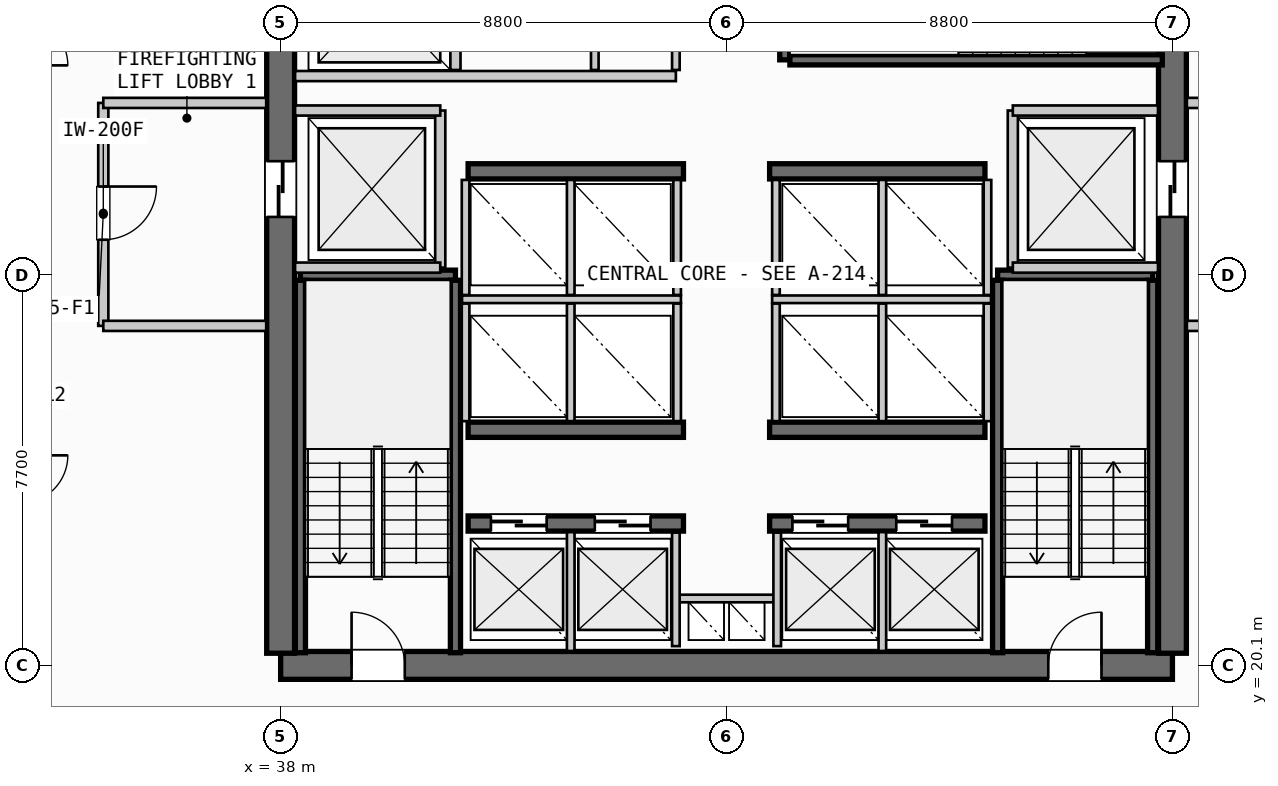
"""IFC4 building model, lengths in metres.
Left out: names, types, materials, properties, quantities, classifications, styles, units other than length and angle.
Written with IfcOpenShell. Run it as: python <this file> out.ifc"""

import sys

from ifc_helpers import new_model, si_unit, direction, frame, frame_2d, origin, place, context, subcontext, project, spatial, rectangle, extrude, source, transform, mapped, element, fill, save


model = new_model("IFC4")
c1 = context("Model", 3, precision=1e-05, world=origin(), true_north=direction((0.0, 1.0)))
c2 = subcontext(c1, "Body", "Model", "MODEL_VIEW")
j1 = project(units=[si_unit("LENGTHUNIT", "METRE"), si_unit("PLANEANGLEUNIT", "RADIAN")], contexts=[c1])
p1 = place(None, origin())
s1 = spatial("IfcSite", under=j1, at=p1, CompositionType="ELEMENT")
p2 = place(p1, origin())
s2 = spatial("IfcBuilding", under=s1, at=p2, CompositionType="ELEMENT")
p3 = place(p2, frame((0.0, 0.0, 103.6)))
s3 = spatial("IfcBuildingStorey", under=s2, at=p3, CompositionType="ELEMENT", Elevation=103.6)
p4 = place(p3, frame((38.0, 20.1, 0.0), z_axis=(0.0, 0.0, 1.0), x_axis=(1.0, 0.0, 0.0)))
e1 = element("IfcWall", 1, at=p4, inside=s3, PredefinedType="SHEAR", context=c2, shape_type="SweptSolid", body=[
    extrude(rectangle(XDim=17.6, YDim=0.55, at=frame_2d((8.8, 0.0))), origin(), (0.0, 0.0, 1.0), 3.35),
])
p5 = place(p4, frame((1.4, 0.0, 0.0)))
e2 = element("IfcOpeningElement", 2, at=p5, cuts=e1, PredefinedType="OPENING", context=c2, shape_type="SweptSolid", body=[
    extrude(rectangle(XDim=1.05, YDim=2.15, at=frame_2d((0.525, 1.075))), frame((0.0, 0.285, 0.0), z_axis=(0.0, -1.0, 0.0), x_axis=(1.0, 0.0, 0.0)), (0.0, 0.0, 1.0), 0.57),
])
p6 = place(p4, frame((15.15, 0.0, 0.0)))
e3 = element("IfcOpeningElement", 3, at=p6, cuts=e1, PredefinedType="OPENING", context=c2, shape_type="SweptSolid", body=[
    extrude(rectangle(XDim=1.05, YDim=2.15, at=frame_2d((0.525, 1.075))), frame((0.0, 0.285, 0.0), z_axis=(0.0, -1.0, 0.0), x_axis=(1.0, 0.0, 0.0)), (0.0, 0.0, 1.0), 0.57),
])
p7 = place(p3, frame((38.0, 35.26, 0.0), z_axis=(0.0, 0.0, 1.0), x_axis=(0.0, -1.0, 0.0)))
e4 = element("IfcWall", 4, at=p7, inside=s3, PredefinedType="SHEAR", context=c2, shape_type="SweptSolid", body=[
    extrude(rectangle(XDim=14.92, YDim=0.55, at=frame_2d((7.46, 0.0))), origin(), (0.0, 0.0, 1.0), 3.35),
])
p8 = place(p7, frame((5.21, 0.0, 0.0)))
e5 = element("IfcOpeningElement", 5, at=p8, cuts=e4, PredefinedType="OPENING", context=c2, shape_type="SweptSolid", body=[
    extrude(rectangle(XDim=1.1, YDim=2.2, at=frame_2d((0.55, 1.1))), frame((0.0, 0.285, 0.0), z_axis=(0.0, -1.0, 0.0), x_axis=(1.0, 0.0, 0.0)), (0.0, 0.0, 1.0), 0.57),
])
p9 = place(p3, frame((55.6, 20.34, 0.0), z_axis=(0.0, 0.0, 1.0), x_axis=(0.0, 1.0, 0.0)))
e6 = element("IfcWall", 6, at=p9, inside=s3, PredefinedType="SHEAR", context=c2, shape_type="SweptSolid", body=[
    extrude(rectangle(XDim=14.92, YDim=0.55, at=frame_2d((7.46, 0.0))), origin(), (0.0, 0.0, 1.0), 3.35),
])
p10 = place(p9, frame((12.71, 0.0, 0.0)))
e7 = element("IfcOpeningElement", 7, at=p10, cuts=e6, PredefinedType="OPENING", context=c2, shape_type="SweptSolid", body=[
    extrude(rectangle(XDim=1.05, YDim=2.15, at=frame_2d((0.525, 1.075))), frame((0.0, 0.285, 0.0), z_axis=(0.0, -1.0, 0.0), x_axis=(1.0, 0.0, 0.0)), (0.0, 0.0, 1.0), 0.57),
])
p11 = place(p9, frame((8.61, 0.0, 0.0)))
e8 = element("IfcOpeningElement", 8, at=p11, cuts=e6, PredefinedType="OPENING", context=c2, shape_type="SweptSolid", body=[
    extrude(rectangle(XDim=1.1, YDim=2.2, at=frame_2d((0.55, 1.1))), frame((0.0, 0.285, 0.0), z_axis=(0.0, -1.0, 0.0), x_axis=(1.0, 0.0, 0.0)), (0.0, 0.0, 1.0), 0.57),
])
p12 = place(p3, frame((41.7, 22.9, 0.0), z_axis=(0.0, 0.0, 1.0), x_axis=(1.0, 0.0, 0.0)))
e9 = element("IfcWall", 9, at=p12, inside=s3, PredefinedType="SHEAR", context=c2, shape_type="SweptSolid", body=[
    extrude(rectangle(XDim=4.25, YDim=0.3, at=frame_2d((2.125, 0.0))), origin(), (0.0, 0.0, 1.0), 3.35),
])
p13 = place(p12, frame((0.45, 0.0, 0.0)))
e10 = element("IfcOpeningElement", 10, at=p13, cuts=e9, PredefinedType="OPENING", context=c2, shape_type="SweptSolid", body=[
    extrude(rectangle(XDim=1.1, YDim=2.2, at=frame_2d((0.55, 1.1))), frame((0.0, 0.16, 0.0), z_axis=(0.0, -1.0, 0.0), x_axis=(1.0, 0.0, 0.0)), (0.0, 0.0, 1.0), 0.32),
])
p14 = place(p12, frame((2.5, 0.0, 0.0)))
e11 = element("IfcOpeningElement", 11, at=p14, cuts=e9, PredefinedType="OPENING", context=c2, shape_type="SweptSolid", body=[
    extrude(rectangle(XDim=1.1, YDim=2.2, at=frame_2d((0.55, 1.1))), frame((0.0, 0.16, 0.0), z_axis=(0.0, -1.0, 0.0), x_axis=(1.0, 0.0, 0.0)), (0.0, 0.0, 1.0), 0.32),
])
p15 = place(p3, frame((47.65, 22.9, 0.0), z_axis=(0.0, 0.0, 1.0), x_axis=(1.0, 0.0, 0.0)))
e12 = element("IfcWall", 12, at=p15, inside=s3, PredefinedType="SHEAR", context=c2, shape_type="SweptSolid", body=[
    extrude(rectangle(XDim=4.25, YDim=0.3, at=frame_2d((2.125, 0.0))), origin(), (0.0, 0.0, 1.0), 3.35),
])
p16 = place(p15, frame((0.45, 0.0, 0.0)))
e13 = element("IfcOpeningElement", 13, at=p16, cuts=e12, PredefinedType="OPENING", context=c2, shape_type="SweptSolid", body=[
    extrude(rectangle(XDim=1.1, YDim=2.2, at=frame_2d((0.55, 1.1))), frame((0.0, 0.16, 0.0), z_axis=(0.0, -1.0, 0.0), x_axis=(1.0, 0.0, 0.0)), (0.0, 0.0, 1.0), 0.32),
])
p17 = place(p15, frame((2.5, 0.0, 0.0)))
e14 = element("IfcOpeningElement", 14, at=p17, cuts=e12, PredefinedType="OPENING", context=c2, shape_type="SweptSolid", body=[
    extrude(rectangle(XDim=1.1, YDim=2.2, at=frame_2d((0.55, 1.1))), frame((0.0, 0.16, 0.0), z_axis=(0.0, -1.0, 0.0), x_axis=(1.0, 0.0, 0.0)), (0.0, 0.0, 1.0), 0.32),
])
for number, where, z_axis, x_axis in (
    (15, (41.7, 24.75, 0.0), (0.0, 0.0, 1.0), (1.0, 0.0, 0.0)),
    (16, (47.65, 24.75, 0.0), (0.0, 0.0, 1.0), (1.0, 0.0, 0.0)),
    (17, (41.7, 29.85, 0.0), (0.0, 0.0, 1.0), (1.0, 0.0, 0.0)),
    (18, (47.65, 29.85, 0.0), (0.0, 0.0, 1.0), (1.0, 0.0, 0.0)),
):
    element("IfcWall", number, at=place(p3, frame(where, z_axis=z_axis, x_axis=x_axis)), inside=s3, PredefinedType="SHEAR", context=c2, shape_type="SweptSolid", body=[
        extrude(rectangle(XDim=4.25, YDim=0.3, at=frame_2d((2.125, 0.0))), origin(), (0.0, 0.0, 1.0), 3.35),
    ])
p18 = place(p3, frame((38.39, 27.8, 0.0), z_axis=(0.0, 0.0, 1.0), x_axis=(1.0, 0.0, 0.0)))
e19 = element("IfcWall", 19, at=p18, inside=s3, PredefinedType="SHEAR", context=c2, shape_type="SweptSolid", body=[
    extrude(rectangle(XDim=3.06, YDim=0.2, at=frame_2d((1.53, 0.0))), origin(), (0.0, 0.0, 1.0), 3.35),
])
for number, where, z_axis, x_axis in (
    (20, (41.45, 27.7, 0.0), (0.0, 0.0, 1.0), (0.0, -1.0, 0.0)),
    (21, (38.39, 20.35, 0.0), (0.0, 0.0, 1.0), (0.0, 1.0, 0.0)),
):
    element("IfcWall", number, at=place(p3, frame(where, z_axis=z_axis, x_axis=x_axis)), inside=s3, PredefinedType="SHEAR", context=c2, shape_type="SweptSolid", body=[
        extrude(rectangle(XDim=7.35, YDim=0.2, at=frame_2d((3.675, 0.0))), origin(), (0.0, 0.0, 1.0), 3.35),
    ])
p19 = place(p3, frame((52.15, 27.8, 0.0), z_axis=(0.0, 0.0, 1.0), x_axis=(1.0, 0.0, 0.0)))
e22 = element("IfcWall", 22, at=p19, inside=s3, PredefinedType="SHEAR", context=c2, shape_type="SweptSolid", body=[
    extrude(rectangle(XDim=3.06, YDim=0.2, at=frame_2d((1.53, 0.0))), origin(), (0.0, 0.0, 1.0), 3.35),
])
for number, where, z_axis, x_axis in (
    (23, (55.21, 27.7, 0.0), (0.0, 0.0, 1.0), (0.0, -1.0, 0.0)),
    (24, (52.15, 20.35, 0.0), (0.0, 0.0, 1.0), (0.0, 1.0, 0.0)),
):
    element("IfcWall", number, at=place(p3, frame(where, z_axis=z_axis, x_axis=x_axis)), inside=s3, PredefinedType="SHEAR", context=c2, shape_type="SweptSolid", body=[
        extrude(rectangle(XDim=7.35, YDim=0.2, at=frame_2d((3.675, 0.0))), origin(), (0.0, 0.0, 1.0), 3.35),
    ])
p20 = place(p3, frame((47.95, 32.05, 0.0), z_axis=(0.0, 0.0, 1.0), x_axis=(0.0, 1.0, 0.0)))
e25 = element("IfcWall", 25, at=p20, inside=s3, PredefinedType="SHEAR", context=c2, shape_type="SweptSolid", body=[
    extrude(rectangle(XDim=3.06, YDim=0.2, at=frame_2d((1.53, 0.0))), origin(), (0.0, 0.0, 1.0), 3.35),
])
p21 = place(p3, frame((55.4, 32.05, 0.0), z_axis=(0.0, 0.0, 1.0), x_axis=(-1.0, 0.0, 0.0)))
e26 = element("IfcWall", 26, at=p21, inside=s3, PredefinedType="SHEAR", context=c2, shape_type="SweptSolid", body=[
    extrude(rectangle(XDim=7.35, YDim=0.2, at=frame_2d((3.675, 0.0))), origin(), (0.0, 0.0, 1.0), 3.35),
])
p22 = place(p3, frame((45.8, 21.42, 0.0), z_axis=(0.0, 0.0, 1.0), x_axis=(1.0, 0.0, 0.0)))
e27 = element("IfcWall", 27, at=p22, inside=s3, PredefinedType="PARTITIONING", context=c2, shape_type="SweptSolid", body=[
    extrude(rectangle(XDim=2.0, YDim=0.15, at=frame_2d((1.0, 0.0))), origin(), (0.0, 0.0, 1.0), 2.28),
])
for number, where, z_axis, x_axis in (
    (28, (45.8, 20.48, 0.0), (0.0, 0.0, 1.0), (0.0, 1.0, 0.0)),
    (29, (47.8, 20.48, 0.0), (0.0, 0.0, 1.0), (0.0, 1.0, 0.0)),
):
    element("IfcWall", number, at=place(p3, frame(where, z_axis=z_axis, x_axis=x_axis)), inside=s3, PredefinedType="PARTITIONING", context=c2, shape_type="SweptSolid", body=[
        extrude(rectangle(XDim=2.24, YDim=0.15, at=frame_2d((1.12, 0.0))), origin(), (0.0, 0.0, 1.0), 2.28),
    ])
p23 = place(p3, frame((41.15, 27.95, 0.0), z_axis=(0.0, 0.0, 1.0), x_axis=(0.0, 1.0, 0.0)))
e30 = element("IfcWall", 30, at=p23, inside=s3, PredefinedType="PARTITIONING", context=c2, shape_type="SweptSolid", body=[
    extrude(rectangle(XDim=3.1, YDim=0.2, at=frame_2d((1.55, 0.0))), origin(), (0.0, 0.0, 1.0), 2.28),
])
for number, where, z_axis, x_axis in (
    (31, (38.285, 27.95, 0.0), (0.0, 0.0, 1.0), (1.0, 0.0, 0.0)),
    (32, (38.285, 31.05, 0.0), (0.0, 0.0, 1.0), (1.0, 0.0, 0.0)),
):
    element("IfcWall", number, at=place(p3, frame(where, z_axis=z_axis, x_axis=x_axis)), inside=s3, PredefinedType="PARTITIONING", context=c2, shape_type="SweptSolid", body=[
        extrude(rectangle(XDim=2.865, YDim=0.2, at=frame_2d((1.433, 0.0))), origin(), (0.0, 0.0, 1.0), 2.28),
    ])
p24 = place(p3, frame((34.5, 31.2, 0.0), z_axis=(0.0, 0.0, 1.0), x_axis=(0.0, -1.0, 0.0)))
e33 = element("IfcWall", 33, at=p24, inside=s3, PredefinedType="PARTITIONING", context=c2, shape_type="SweptSolid", body=[
    extrude(rectangle(XDim=4.4, YDim=0.2, at=frame_2d((2.2, 0.0))), origin(), (0.0, 0.0, 1.0), 2.28),
])
p25 = place(p24, frame((1.65, 0.0, 0.0)))
e34 = element("IfcOpeningElement", 34, at=p25, cuts=e33, PredefinedType="OPENING", context=c2, shape_type="SweptSolid", body=[
    extrude(rectangle(XDim=1.05, YDim=2.15, at=frame_2d((0.525, 1.075))), frame((0.0, 0.11, 0.0), z_axis=(0.0, -1.0, 0.0), x_axis=(1.0, 0.0, 0.0)), (0.0, 0.0, 1.0), 0.22),
])
for number, where, z_axis, x_axis in (
    (35, (34.5, 26.8, 0.0), (0.0, 0.0, 1.0), (1.0, 0.0, 0.0)),
    (36, (34.5, 31.2, 0.0), (0.0, 0.0, 1.0), (1.0, 0.0, 0.0)),
):
    element("IfcWall", number, at=place(p3, frame(where, z_axis=z_axis, x_axis=x_axis)), inside=s3, PredefinedType="PARTITIONING", context=c2, shape_type="SweptSolid", body=[
        extrude(rectangle(XDim=3.215, YDim=0.2, at=frame_2d((1.607, 0.0))), origin(), (0.0, 0.0, 1.0), 2.28),
    ])
p26 = place(p3, frame((52.45, 27.95, 0.0), z_axis=(0.0, 0.0, 1.0), x_axis=(0.0, 1.0, 0.0)))
e37 = element("IfcWall", 37, at=p26, inside=s3, PredefinedType="PARTITIONING", context=c2, shape_type="SweptSolid", body=[
    extrude(rectangle(XDim=3.1, YDim=0.2, at=frame_2d((1.55, 0.0))), origin(), (0.0, 0.0, 1.0), 2.28),
])
for number, where, z_axis, x_axis in (
    (38, (52.45, 27.95, 0.0), (0.0, 0.0, 1.0), (1.0, 0.0, 0.0)),
    (39, (52.45, 31.05, 0.0), (0.0, 0.0, 1.0), (1.0, 0.0, 0.0)),
):
    element("IfcWall", number, at=place(p3, frame(where, z_axis=z_axis, x_axis=x_axis)), inside=s3, PredefinedType="PARTITIONING", context=c2, shape_type="SweptSolid", body=[
        extrude(rectangle(XDim=2.865, YDim=0.2, at=frame_2d((1.433, 0.0))), origin(), (0.0, 0.0, 1.0), 2.28),
    ])
for number, where, z_axis, x_axis in (
    (40, (55.885, 26.8, 0.0), (0.0, 0.0, 1.0), (1.0, 0.0, 0.0)),
    (41, (55.885, 31.2, 0.0), (0.0, 0.0, 1.0), (1.0, 0.0, 0.0)),
):
    element("IfcWall", number, at=place(p3, frame(where, z_axis=z_axis, x_axis=x_axis)), inside=s3, PredefinedType="PARTITIONING", context=c2, shape_type="SweptSolid", body=[
        extrude(rectangle(XDim=3.215, YDim=0.2, at=frame_2d((1.607, 0.0))), origin(), (0.0, 0.0, 1.0), 2.28),
    ])
for number, where, z_axis, x_axis in (
    (42, (43.725, 20.385, 0.0), (0.0, 0.0, 1.0), (0.0, 1.0, 0.0)),
    (43, (49.875, 20.385, 0.0), (0.0, 0.0, 1.0), (0.0, 1.0, 0.0)),
):
    element("IfcWall", number, at=place(p3, frame(where, z_axis=z_axis, x_axis=x_axis)), inside=s3, PredefinedType="PARTITIONING", context=c2, shape_type="SweptSolid", body=[
        extrude(rectangle(XDim=2.345, YDim=0.15, at=frame_2d((1.172, 0.0))), origin(), (0.0, 0.0, 1.0), 2.28),
    ])
p27 = place(p3, frame((41.58, 27.325, 0.0), z_axis=(0.0, 0.0, 1.0), x_axis=(1.0, 0.0, 0.0)))
e44 = element("IfcWall", 44, at=p27, inside=s3, PredefinedType="PARTITIONING", context=c2, shape_type="SweptSolid", body=[
    extrude(rectangle(XDim=4.32, YDim=0.15, at=frame_2d((2.16, 0.0))), origin(), (0.0, 0.0, 1.0), 2.28),
])
p28 = place(p3, frame((47.7, 27.325, 0.0), z_axis=(0.0, 0.0, 1.0), x_axis=(1.0, 0.0, 0.0)))
e45 = element("IfcWall", 45, at=p28, inside=s3, PredefinedType="PARTITIONING", context=c2, shape_type="SweptSolid", body=[
    extrude(rectangle(XDim=4.32, YDim=0.15, at=frame_2d((2.16, 0.0))), origin(), (0.0, 0.0, 1.0), 2.28),
])
for number, where, z_axis, x_axis in (
    (46, (41.65, 24.92, 0.0), (0.0, 0.0, 1.0), (0.0, 1.0, 0.0)),
    (47, (43.725, 24.92, 0.0), (0.0, 0.0, 1.0), (0.0, 1.0, 0.0)),
    (48, (45.825, 24.92, 0.0), (0.0, 0.0, 1.0), (0.0, 1.0, 0.0)),
    (49, (47.775, 24.92, 0.0), (0.0, 0.0, 1.0), (0.0, 1.0, 0.0)),
    (50, (49.875, 24.92, 0.0), (0.0, 0.0, 1.0), (0.0, 1.0, 0.0)),
    (51, (51.95, 24.92, 0.0), (0.0, 0.0, 1.0), (0.0, 1.0, 0.0)),
):
    element("IfcWall", number, at=place(p3, frame(where, z_axis=z_axis, x_axis=x_axis)), inside=s3, PredefinedType="PARTITIONING", context=c2, shape_type="SweptSolid", body=[
        extrude(rectangle(XDim=2.32, YDim=0.15, at=frame_2d((1.16, 0.0))), origin(), (0.0, 0.0, 1.0), 2.28),
    ])
for number, where, z_axis, x_axis in (
    (52, (41.65, 27.41, 0.0), (0.0, 0.0, 1.0), (0.0, 1.0, 0.0)),
    (53, (43.725, 27.41, 0.0), (0.0, 0.0, 1.0), (0.0, 1.0, 0.0)),
    (54, (45.825, 27.41, 0.0), (0.0, 0.0, 1.0), (0.0, 1.0, 0.0)),
    (55, (47.775, 27.41, 0.0), (0.0, 0.0, 1.0), (0.0, 1.0, 0.0)),
    (56, (49.875, 27.41, 0.0), (0.0, 0.0, 1.0), (0.0, 1.0, 0.0)),
    (57, (51.95, 27.41, 0.0), (0.0, 0.0, 1.0), (0.0, 1.0, 0.0)),
):
    element("IfcWall", number, at=place(p3, frame(where, z_axis=z_axis, x_axis=x_axis)), inside=s3, PredefinedType="PARTITIONING", context=c2, shape_type="SweptSolid", body=[
        extrude(rectangle(XDim=2.27, YDim=0.15, at=frame_2d((1.135, 0.0))), origin(), (0.0, 0.0, 1.0), 2.28),
    ])
p29 = place(p3, frame((41.45, 31.85, 0.0), z_axis=(0.0, 0.0, 1.0), x_axis=(0.0, 1.0, 0.0)))
e58 = element("IfcWall", 58, at=p29, inside=s3, PredefinedType="PARTITIONING", context=c2, shape_type="SweptSolid", body=[
    extrude(rectangle(XDim=3.365, YDim=0.2, at=frame_2d((1.683, 0.0))), origin(), (0.0, 0.0, 1.0), 2.28),
])
p30 = place(p3, frame((38.285, 31.73, 0.0), z_axis=(0.0, 0.0, 1.0), x_axis=(1.0, 0.0, 0.0)))
e59 = element("IfcWall", 59, at=p30, inside=s3, PredefinedType="PARTITIONING", context=c2, shape_type="SweptSolid", body=[
    extrude(rectangle(XDim=7.515, YDim=0.2, at=frame_2d((3.758, 0.0))), origin(), (0.0, 0.0, 1.0), 2.28),
])
p31 = place(p3, frame((45.8, 31.85, 0.0), z_axis=(0.0, 0.0, 1.0), x_axis=(0.0, 1.0, 0.0)))
e60 = element("IfcWall", 60, at=p31, inside=s3, PredefinedType="PARTITIONING", context=c2, shape_type="SweptSolid", body=[
    extrude(rectangle(XDim=3.365, YDim=0.15, at=frame_2d((1.683, 0.0))), origin(), (0.0, 0.0, 1.0), 2.28),
])
p32 = place(p3, frame((44.2, 31.85, 0.0), z_axis=(0.0, 0.0, 1.0), x_axis=(0.0, 1.0, 0.0)))
e61 = element("IfcWall", 61, at=p32, inside=s3, PredefinedType="PLUMBINGWALL", context=c2, shape_type="SweptSolid", body=[
    extrude(rectangle(XDim=3.365, YDim=0.15, at=frame_2d((1.683, 0.0))), origin(), (0.0, 0.0, 1.0), 2.28),
])
m1 = source(origin(), c2, "Body", "SweptSolid", [
    extrude(rectangle(XDim=1.05, YDim=2.15, at=frame_2d((0.525, 1.075))), frame((0.0, 0.025, 0.0), z_axis=(0.0, -1.0, 0.0), x_axis=(1.0, 0.0, 0.0)), (0.0, 0.0, 1.0), 0.05),
])
p33 = place(p5, origin())
e62 = element("IfcDoor", 62, at=p33, inside=s3, OperationType="SINGLE_SWING_LEFT", PredefinedType="DOOR", context=c2, shape_type="MappedRepresentation", body=[
    mapped(m1, transform((0.0, 0.0, 0.0), scale=1.0)),
])
fill(e2, e62)
p34 = place(p6, origin())
e63 = element("IfcDoor", 63, at=p34, inside=s3, OperationType="SINGLE_SWING_RIGHT", PredefinedType="DOOR", context=c2, shape_type="MappedRepresentation", body=[
    mapped(m1, transform((0.0, 0.0, 0.0), scale=1.0)),
])
fill(e3, e63)
m2 = source(origin(), c2, "Body", "SweptSolid", [
    extrude(rectangle(XDim=1.1, YDim=2.2, at=frame_2d((0.55, 1.1))), frame((0.0, 0.025, 0.0), z_axis=(0.0, -1.0, 0.0), x_axis=(1.0, 0.0, 0.0)), (0.0, 0.0, 1.0), 0.05),
])
p35 = place(p8, origin())
e64 = element("IfcDoor", 64, at=p35, inside=s3, OperationType="SLIDING_TO_LEFT", PredefinedType="DOOR", context=c2, shape_type="MappedRepresentation", body=[
    mapped(m2, transform((0.0, 0.0, 0.0), scale=1.0)),
])
fill(e5, e64)
p36 = place(p11, origin())
e65 = element("IfcDoor", 65, at=p36, inside=s3, OperationType="SLIDING_TO_RIGHT", PredefinedType="DOOR", context=c2, shape_type="MappedRepresentation", body=[
    mapped(m2, transform((0.0, 0.0, 0.0), scale=1.0)),
])
fill(e8, e65)
p37 = place(p13, origin())
e66 = element("IfcDoor", 66, at=p37, inside=s3, OperationType="SLIDING_TO_LEFT", PredefinedType="DOOR", context=c2, shape_type="MappedRepresentation", body=[
    mapped(m2, transform((0.0, 0.0, 0.0), scale=1.0)),
])
fill(e10, e66)
p38 = place(p14, origin())
e67 = element("IfcDoor", 67, at=p38, inside=s3, OperationType="SLIDING_TO_LEFT", PredefinedType="DOOR", context=c2, shape_type="MappedRepresentation", body=[
    mapped(m2, transform((0.0, 0.0, 0.0), scale=1.0)),
])
fill(e11, e67)
p39 = place(p16, origin())
e68 = element("IfcDoor", 68, at=p39, inside=s3, OperationType="SLIDING_TO_LEFT", PredefinedType="DOOR", context=c2, shape_type="MappedRepresentation", body=[
    mapped(m2, transform((0.0, 0.0, 0.0), scale=1.0)),
])
fill(e13, e68)
p40 = place(p17, origin())
e69 = element("IfcDoor", 69, at=p40, inside=s3, OperationType="SLIDING_TO_LEFT", PredefinedType="DOOR", context=c2, shape_type="MappedRepresentation", body=[
    mapped(m2, transform((0.0, 0.0, 0.0), scale=1.0)),
])
fill(e14, e69)
p41 = place(p25, origin())
e70 = element("IfcDoor", 70, at=p41, inside=s3, OperationType="SINGLE_SWING_LEFT", PredefinedType="DOOR", context=c2, shape_type="MappedRepresentation", body=[
    mapped(m1, transform((0.0, 0.0, 0.0), scale=1.0)),
])
fill(e34, e70)
save(model, sys.argv[1])
